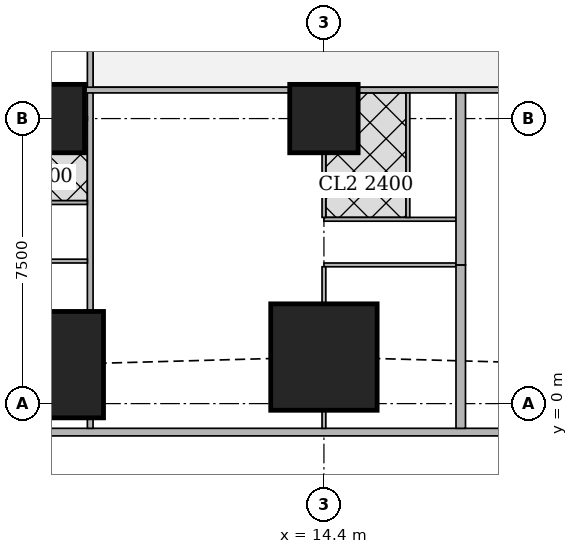
"""IFC4 building model, lengths in metres.
Left out: names, types, materials, properties, quantities, classifications, styles, units other than length and angle.
Written with IfcOpenShell. Run it as: python <this file> out.ifc"""

import sys

from ifc_helpers import new_model, si_unit, direction, frame, frame_2d, origin, origin_2d, place, context, subcontext, project, spatial, rectangle, extrude, element, fill, save


model = new_model("IFC4")
c1 = context("Model", 3, precision=1e-05, world=origin(), true_north=direction((0.0, 1.0)))
c2 = subcontext(c1, "Body", "Model", "MODEL_VIEW")
j1 = project(units=[si_unit("LENGTHUNIT", "METRE"), si_unit("PLANEANGLEUNIT", "RADIAN")], contexts=[c1])
p1 = place(None, origin())
s1 = spatial("IfcSite", under=j1, at=p1, CompositionType="ELEMENT")
p2 = place(p1, origin())
s2 = spatial("IfcBuilding", under=s1, at=p2, CompositionType="ELEMENT")
p3 = place(p2, frame((0.0, 0.0, 53.75)))
s3 = spatial("IfcBuildingStorey", under=s2, at=p3, CompositionType="ELEMENT", Elevation=53.75)
for number, where, z_axis, x_axis in (
    (1, (7.2, 1.025, 0.0), (0.0, 0.0, 1.0), (1.0, 0.0, 0.0)),
    (2, (14.4, 1.225, 0.0), (0.0, 0.0, 1.0), (1.0, 0.0, 0.0)),
):
    element("IfcColumn", number, at=place(p3, frame(where, z_axis=z_axis, x_axis=x_axis)), inside=s3, PredefinedType="COLUMN", context=c2, shape_type="SweptSolid", body=[
        extrude(rectangle(XDim=2.8, YDim=2.8, at=origin_2d()), origin(), (0.0, 0.0, 1.0), 3.75),
    ])
for number, where, z_axis, x_axis in (
    (3, (7.2, 7.5, 0.0), (0.0, 0.0, 1.0), (1.0, 0.0, 0.0)),
    (4, (14.4, 7.5, 0.0), (0.0, 0.0, 1.0), (1.0, 0.0, 0.0)),
):
    element("IfcColumn", number, at=place(p3, frame(where, z_axis=z_axis, x_axis=x_axis)), inside=s3, PredefinedType="COLUMN", context=c2, shape_type="SweptSolid", body=[
        extrude(rectangle(XDim=1.8, YDim=1.8, at=origin_2d()), origin(), (0.0, 0.0, 1.0), 3.75),
    ])
p4 = place(p3, frame((2.163, -0.75, 0.0), z_axis=(0.0, 0.0, 1.0), x_axis=(1.0, 0.0, 0.0)))
e5 = element("IfcWall", 5, at=p4, inside=s3, PredefinedType="SOLIDWALL", context=c2, shape_type="SweptSolid", body=[
    extrude(rectangle(XDim=45.628, YDim=0.2, at=frame_2d((22.814, 0.0))), origin(), (0.0, 0.0, 1.0), 3.5),
])
p5 = place(p4, frame((9.537, 0.0, 0.9)))
e6 = element("IfcOpeningElement", 6, at=p5, cuts=e5, PredefinedType="OPENING", context=c2, shape_type="SweptSolid", body=[
    extrude(rectangle(XDim=1.8, YDim=1.5, at=frame_2d((0.9, 0.75))), frame((0.0, 0.11, 0.0), z_axis=(0.0, -1.0, 0.0), x_axis=(1.0, 0.0, 0.0)), (0.0, 0.0, 1.0), 0.22),
])
p6 = place(p4, frame((13.137, 0.0, 0.9)))
e7 = element("IfcOpeningElement", 7, at=p6, cuts=e5, PredefinedType="OPENING", context=c2, shape_type="SweptSolid", body=[
    extrude(rectangle(XDim=1.8, YDim=1.5, at=frame_2d((0.9, 0.75))), frame((0.0, 0.11, 0.0), z_axis=(0.0, -1.0, 0.0), x_axis=(1.0, 0.0, 0.0)), (0.0, 0.0, 1.0), 0.22),
])
p7 = place(p4, frame((16.737, 0.0, 0.9)))
e8 = element("IfcOpeningElement", 8, at=p7, cuts=e5, PredefinedType="OPENING", context=c2, shape_type="SweptSolid", body=[
    extrude(rectangle(XDim=1.8, YDim=1.5, at=frame_2d((0.9, 0.75))), frame((0.0, 0.11, 0.0), z_axis=(0.0, -1.0, 0.0), x_axis=(1.0, 0.0, 0.0)), (0.0, 0.0, 1.0), 0.22),
])
p8 = place(p4, frame((20.337, 0.0, 0.9)))
e9 = element("IfcOpeningElement", 9, at=p8, cuts=e5, PredefinedType="OPENING", context=c2, shape_type="SweptSolid", body=[
    extrude(rectangle(XDim=1.8, YDim=1.5, at=frame_2d((0.9, 0.75))), frame((0.0, 0.11, 0.0), z_axis=(0.0, -1.0, 0.0), x_axis=(1.0, 0.0, 0.0)), (0.0, 0.0, 1.0), 0.22),
])
p9 = place(p4, frame((23.937, 0.0, 0.9)))
e10 = element("IfcOpeningElement", 10, at=p9, cuts=e5, PredefinedType="OPENING", context=c2, shape_type="SweptSolid", body=[
    extrude(rectangle(XDim=1.8, YDim=1.5, at=frame_2d((0.9, 0.75))), frame((0.0, 0.11, 0.0), z_axis=(0.0, -1.0, 0.0), x_axis=(1.0, 0.0, 0.0)), (0.0, 0.0, 1.0), 0.22),
])
p10 = place(p4, frame((27.537, 0.0, 0.9)))
e11 = element("IfcOpeningElement", 11, at=p10, cuts=e5, PredefinedType="OPENING", context=c2, shape_type="SweptSolid", body=[
    extrude(rectangle(XDim=1.8, YDim=1.5, at=frame_2d((0.9, 0.75))), frame((0.0, 0.11, 0.0), z_axis=(0.0, -1.0, 0.0), x_axis=(1.0, 0.0, 0.0)), (0.0, 0.0, 1.0), 0.22),
])
p11 = place(p4, frame((31.137, 0.0, 0.9)))
e12 = element("IfcOpeningElement", 12, at=p11, cuts=e5, PredefinedType="OPENING", context=c2, shape_type="SweptSolid", body=[
    extrude(rectangle(XDim=1.8, YDim=1.5, at=frame_2d((0.9, 0.75))), frame((0.0, 0.11, 0.0), z_axis=(0.0, -1.0, 0.0), x_axis=(1.0, 0.0, 0.0)), (0.0, 0.0, 1.0), 0.22),
])
p12 = place(p4, frame((34.737, 0.0, 0.9)))
e13 = element("IfcOpeningElement", 13, at=p12, cuts=e5, PredefinedType="OPENING", context=c2, shape_type="SweptSolid", body=[
    extrude(rectangle(XDim=1.8, YDim=1.5, at=frame_2d((0.9, 0.75))), frame((0.0, 0.11, 0.0), z_axis=(0.0, -1.0, 0.0), x_axis=(1.0, 0.0, 0.0)), (0.0, 0.0, 1.0), 0.22),
])
p13 = place(p3, frame((8.25, -0.65, 0.0), z_axis=(0.0, 0.0, 1.0), x_axis=(0.0, 1.0, 0.0)))
e14 = element("IfcWall", 14, at=p13, inside=s3, PredefinedType="SOLIDWALL", context=c2, shape_type="SweptSolid", body=[
    extrude(rectangle(XDim=0.274, YDim=0.15, at=frame_2d((0.137, 0.0))), origin(), (0.0, 0.0, 1.0), 3.5),
])
p14 = place(p3, frame((8.25, 2.426, 0.0), z_axis=(0.0, 0.0, 1.0), x_axis=(0.0, 1.0, 0.0)))
e15 = element("IfcWall", 15, at=p14, inside=s3, PredefinedType="SOLIDWALL", context=c2, shape_type="SweptSolid", body=[
    extrude(rectangle(XDim=40.173, YDim=0.15, at=frame_2d((20.086, 0.0))), origin(), (0.0, 0.0, 1.0), 3.5),
])
p15 = place(p14, frame((6.661, 0.0, 0.0)))
e16 = element("IfcOpeningElement", 16, at=p15, cuts=e15, PredefinedType="OPENING", context=c2, shape_type="SweptSolid", body=[
    extrude(rectangle(XDim=1.0, YDim=2.1, at=frame_2d((0.5, 1.05))), frame((0.0, 0.085, 0.0), z_axis=(0.0, -1.0, 0.0), x_axis=(1.0, 0.0, 0.0)), (0.0, 0.0, 1.0), 0.17),
])
p16 = place(p14, frame((9.986, 0.0, 0.0)))
e17 = element("IfcOpeningElement", 17, at=p16, cuts=e15, PredefinedType="OPENING", context=c2, shape_type="SweptSolid", body=[
    extrude(rectangle(XDim=1.0, YDim=2.1, at=frame_2d((0.5, 1.05))), frame((0.0, 0.085, 0.0), z_axis=(0.0, -1.0, 0.0), x_axis=(1.0, 0.0, 0.0)), (0.0, 0.0, 1.0), 0.17),
])
p17 = place(p14, frame((21.662, 0.0, 0.0)))
e18 = element("IfcOpeningElement", 18, at=p17, cuts=e15, PredefinedType="OPENING", context=c2, shape_type="SweptSolid", body=[
    extrude(rectangle(XDim=1.0, YDim=2.1, at=frame_2d((0.5, 1.05))), frame((0.0, 0.085, 0.0), z_axis=(0.0, -1.0, 0.0), x_axis=(1.0, 0.0, 0.0)), (0.0, 0.0, 1.0), 0.17),
])
p18 = place(p14, frame((29.161, 0.0, 0.0)))
e19 = element("IfcOpeningElement", 19, at=p18, cuts=e15, PredefinedType="OPENING", context=c2, shape_type="SweptSolid", body=[
    extrude(rectangle(XDim=1.0, YDim=2.1, at=frame_2d((0.5, 1.05))), frame((0.0, 0.085, 0.0), z_axis=(0.0, -1.0, 0.0), x_axis=(1.0, 0.0, 0.0)), (0.0, 0.0, 1.0), 0.17),
])
p19 = place(p3, frame((20.699, 8.25, 0.0), z_axis=(0.0, 0.0, 1.0), x_axis=(-1.0, 0.0, 0.0)))
e20 = element("IfcWall", 20, at=p19, inside=s3, PredefinedType="SOLIDWALL", context=c2, shape_type="SweptSolid", body=[
    extrude(rectangle(XDim=5.398, YDim=0.15, at=frame_2d((2.699, 0.0))), origin(), (0.0, 0.0, 1.0), 3.5),
])
p20 = place(p19, frame((0.799, 0.0, 0.0)))
e21 = element("IfcOpeningElement", 21, at=p20, cuts=e20, PredefinedType="OPENING", context=c2, shape_type="SweptSolid", body=[
    extrude(rectangle(XDim=1.0, YDim=2.1, at=frame_2d((0.5, 1.05))), frame((0.0, 0.085, 0.0), z_axis=(0.0, -1.0, 0.0), x_axis=(1.0, 0.0, 0.0)), (0.0, 0.0, 1.0), 0.17),
])
p21 = place(p3, frame((13.499, 8.25, 0.0), z_axis=(0.0, 0.0, 1.0), x_axis=(-1.0, 0.0, 0.0)))
e22 = element("IfcWall", 22, at=p21, inside=s3, PredefinedType="SOLIDWALL", context=c2, shape_type="SweptSolid", body=[
    extrude(rectangle(XDim=5.399, YDim=0.15, at=frame_2d((2.699, 0.0))), origin(), (0.0, 0.0, 1.0), 3.5),
])
p22 = place(p21, frame((1.674, 0.0, 0.0)))
e23 = element("IfcOpeningElement", 23, at=p22, cuts=e22, PredefinedType="OPENING", context=c2, shape_type="SweptSolid", body=[
    extrude(rectangle(XDim=1.0, YDim=2.1, at=frame_2d((0.5, 1.05))), frame((0.0, 0.085, 0.0), z_axis=(0.0, -1.0, 0.0), x_axis=(1.0, 0.0, 0.0)), (0.0, 0.0, 1.0), 0.17),
])
p23 = place(p3, frame((4.9, 3.75, 0.0), z_axis=(0.0, 0.0, 1.0), x_axis=(1.0, 0.0, 0.0)))
e24 = element("IfcWall", 24, at=p23, inside=s3, PredefinedType="PARTITIONING", context=c2, shape_type="SweptSolid", body=[
    extrude(rectangle(XDim=3.275, YDim=0.1, at=frame_2d((1.638, 0.0))), origin(), (0.0, 0.0, 1.0), 3.5),
])
p24 = place(p3, frame((8.101, 7.5, 0.0), z_axis=(0.0, 0.0, 1.0), x_axis=(1.0, 0.0, 0.0)))
e25 = element("IfcWall", 25, at=p24, inside=s3, PredefinedType="PARTITIONING", context=c2, shape_type="SweptSolid", body=[
    extrude(rectangle(XDim=0.074, YDim=0.1, at=frame_2d((0.037, 0.0))), origin(), (0.0, 0.0, 1.0), 3.5),
])
p25 = place(p3, frame((4.9, 5.29, 0.0), z_axis=(0.0, 0.0, 1.0), x_axis=(1.0, 0.0, 0.0)))
e26 = element("IfcWall", 26, at=p25, inside=s3, PredefinedType="PARTITIONING", context=c2, shape_type="SweptSolid", body=[
    extrude(rectangle(XDim=3.275, YDim=0.1, at=frame_2d((1.638, 0.0))), origin(), (0.0, 0.0, 1.0), 3.5),
])
p26 = place(p3, frame((17.875, 3.65, 0.0), z_axis=(0.0, 0.0, 1.0), x_axis=(-1.0, 0.0, 0.0)))
e27 = element("IfcWall", 27, at=p26, inside=s3, PredefinedType="PARTITIONING", context=c2, shape_type="SweptSolid", body=[
    extrude(rectangle(XDim=3.475, YDim=0.1, at=frame_2d((1.738, 0.0))), origin(), (0.0, 0.0, 1.0), 3.5),
])
p27 = place(p26, frame((1.15, 0.0, 0.0)))
e28 = element("IfcOpeningElement", 28, at=p27, cuts=e27, PredefinedType="OPENING", context=c2, shape_type="SweptSolid", body=[
    extrude(rectangle(XDim=0.9, YDim=2.1, at=frame_2d((0.45, 1.05))), frame((0.0, 0.06, 0.0), z_axis=(0.0, -1.0, 0.0), x_axis=(1.0, 0.0, 0.0)), (0.0, 0.0, 1.0), 0.12),
])
p28 = place(p3, frame((17.875, 4.85, 0.0), z_axis=(0.0, 0.0, 1.0), x_axis=(-1.0, 0.0, 0.0)))
e29 = element("IfcWall", 29, at=p28, inside=s3, PredefinedType="PARTITIONING", context=c2, shape_type="SweptSolid", body=[
    extrude(rectangle(XDim=3.475, YDim=0.1, at=frame_2d((1.738, 0.0))), origin(), (0.0, 0.0, 1.0), 3.5),
])
p29 = place(p28, frame((1.92, 0.0, 0.0)))
e30 = element("IfcOpeningElement", 30, at=p29, cuts=e29, PredefinedType="OPENING", context=c2, shape_type="SweptSolid", body=[
    extrude(rectangle(XDim=0.9, YDim=2.1, at=frame_2d((0.45, 1.05))), frame((0.0, 0.06, 0.0), z_axis=(0.0, -1.0, 0.0), x_axis=(1.0, 0.0, 0.0)), (0.0, 0.0, 1.0), 0.12),
])
p30 = place(p28, frame((0.15, 0.0, 0.0)))
e31 = element("IfcOpeningElement", 31, at=p30, cuts=e29, PredefinedType="OPENING", context=c2, shape_type="SweptSolid", body=[
    extrude(rectangle(XDim=0.9, YDim=2.1, at=frame_2d((0.45, 1.05))), frame((0.0, 0.06, 0.0), z_axis=(0.0, -1.0, 0.0), x_axis=(1.0, 0.0, 0.0)), (0.0, 0.0, 1.0), 0.12),
])
p31 = place(p3, frame((14.4, -0.65, 0.0), z_axis=(0.0, 0.0, 1.0), x_axis=(0.0, 1.0, 0.0)))
e32 = element("IfcWall", 32, at=p31, inside=s3, PredefinedType="PARTITIONING", context=c2, shape_type="SweptSolid", body=[
    extrude(rectangle(XDim=0.474, YDim=0.1, at=frame_2d((0.237, 0.0))), origin(), (0.0, 0.0, 1.0), 3.5),
])
p32 = place(p3, frame((14.4, 2.626, 0.0), z_axis=(0.0, 0.0, 1.0), x_axis=(0.0, 1.0, 0.0)))
e33 = element("IfcWall", 33, at=p32, inside=s3, PredefinedType="PARTITIONING", context=c2, shape_type="SweptSolid", body=[
    extrude(rectangle(XDim=0.974, YDim=0.1, at=frame_2d((0.487, 0.0))), origin(), (0.0, 0.0, 1.0), 3.5),
])
p33 = place(p3, frame((14.4, 4.9, 0.0), z_axis=(0.0, 0.0, 1.0), x_axis=(0.0, 1.0, 0.0)))
e34 = element("IfcWall", 34, at=p33, inside=s3, PredefinedType="PARTITIONING", context=c2, shape_type="SweptSolid", body=[
    extrude(rectangle(XDim=1.699, YDim=0.1, at=frame_2d((0.85, 0.0))), origin(), (0.0, 0.0, 1.0), 3.5),
])
p34 = place(p3, frame((16.61, 4.9, 0.0), z_axis=(0.0, 0.0, 1.0), x_axis=(0.0, 1.0, 0.0)))
e35 = element("IfcWall", 35, at=p34, inside=s3, PredefinedType="PARTITIONING", context=c2, shape_type="SweptSolid", body=[
    extrude(rectangle(XDim=3.275, YDim=0.1, at=frame_2d((1.638, 0.0))), origin(), (0.0, 0.0, 1.0), 3.5),
])
p35 = place(p3, frame((18.0, -0.65, 0.0), z_axis=(0.0, 0.0, 1.0), x_axis=(0.0, 1.0, 0.0)))
e36 = element("IfcWall", 36, at=p35, inside=s3, PredefinedType="SOLIDWALL", context=c2, shape_type="SweptSolid", body=[
    extrude(rectangle(XDim=4.3, YDim=0.25, at=frame_2d((2.15, 0.0))), origin(), (0.0, 0.0, 1.0), 2.05),
])
p36 = place(p3, frame((18.0, 3.65, 0.0), z_axis=(0.0, 0.0, 1.0), x_axis=(0.0, 1.0, 0.0)))
e37 = element("IfcWall", 37, at=p36, inside=s3, PredefinedType="SOLIDWALL", context=c2, shape_type="SweptSolid", body=[
    extrude(rectangle(XDim=4.525, YDim=0.25, at=frame_2d((2.263, 0.0))), origin(), (0.0, 0.0, 1.0), 3.5),
])
p37 = place(p5, origin())
e38 = element("IfcWindow", 38, at=p37, inside=s3, PartitioningType="SINGLE_PANEL", PredefinedType="WINDOW", context=c2, shape_type="SweptSolid", body=[
    extrude(rectangle(XDim=1.8, YDim=1.5, at=frame_2d((0.9, 0.75))), frame((0.0, 0.03, 0.0), z_axis=(0.0, -1.0, 0.0), x_axis=(1.0, 0.0, 0.0)), (0.0, 0.0, 1.0), 0.06),
])
fill(e6, e38)
p38 = place(p6, origin())
e39 = element("IfcWindow", 39, at=p38, inside=s3, PartitioningType="SINGLE_PANEL", PredefinedType="WINDOW", context=c2, shape_type="SweptSolid", body=[
    extrude(rectangle(XDim=1.8, YDim=1.5, at=frame_2d((0.9, 0.75))), frame((0.0, 0.03, 0.0), z_axis=(0.0, -1.0, 0.0), x_axis=(1.0, 0.0, 0.0)), (0.0, 0.0, 1.0), 0.06),
])
fill(e7, e39)
p39 = place(p7, origin())
e40 = element("IfcWindow", 40, at=p39, inside=s3, PartitioningType="SINGLE_PANEL", PredefinedType="WINDOW", context=c2, shape_type="SweptSolid", body=[
    extrude(rectangle(XDim=1.8, YDim=1.5, at=frame_2d((0.9, 0.75))), frame((0.0, 0.03, 0.0), z_axis=(0.0, -1.0, 0.0), x_axis=(1.0, 0.0, 0.0)), (0.0, 0.0, 1.0), 0.06),
])
fill(e8, e40)
p40 = place(p15, origin())
e41 = element("IfcDoor", 41, at=p40, inside=s3, OperationType="SINGLE_SWING_RIGHT", PredefinedType="DOOR", context=c2, shape_type="SweptSolid", body=[
    extrude(rectangle(XDim=1.0, YDim=2.1, at=frame_2d((0.5, 1.05))), frame((0.0, 0.025, 0.0), z_axis=(0.0, -1.0, 0.0), x_axis=(1.0, 0.0, 0.0)), (0.0, 0.0, 1.0), 0.05),
])
fill(e16, e41)
p41 = place(p27, origin())
e42 = element("IfcDoor", 42, at=p41, inside=s3, OperationType="SINGLE_SWING_LEFT", PredefinedType="DOOR", context=c2, shape_type="SweptSolid", body=[
    extrude(rectangle(XDim=0.9, YDim=2.1, at=frame_2d((0.45, 1.05))), frame((0.0, 0.025, 0.0), z_axis=(0.0, -1.0, 0.0), x_axis=(1.0, 0.0, 0.0)), (0.0, 0.0, 1.0), 0.05),
])
fill(e28, e42)
p42 = place(p29, origin())
e43 = element("IfcDoor", 43, at=p42, inside=s3, OperationType="SINGLE_SWING_LEFT", PredefinedType="DOOR", context=c2, shape_type="SweptSolid", body=[
    extrude(rectangle(XDim=0.9, YDim=2.1, at=frame_2d((0.45, 1.05))), frame((0.0, 0.025, 0.0), z_axis=(0.0, -1.0, 0.0), x_axis=(1.0, 0.0, 0.0)), (0.0, 0.0, 1.0), 0.05),
])
fill(e30, e43)
p43 = place(p30, origin())
e44 = element("IfcDoor", 44, at=p43, inside=s3, OperationType="SINGLE_SWING_RIGHT", PredefinedType="DOOR", context=c2, shape_type="SweptSolid", body=[
    extrude(rectangle(XDim=0.9, YDim=2.1, at=frame_2d((0.45, 1.05))), frame((0.0, 0.025, 0.0), z_axis=(0.0, -1.0, 0.0), x_axis=(1.0, 0.0, 0.0)), (0.0, 0.0, 1.0), 0.05),
])
fill(e31, e44)
p44 = place(p22, origin())
e45 = element("IfcDoor", 45, at=p44, inside=s3, OperationType="SINGLE_SWING_RIGHT", PredefinedType="DOOR", context=c2, shape_type="SweptSolid", body=[
    extrude(rectangle(XDim=1.0, YDim=2.1, at=frame_2d((0.5, 1.05))), frame((0.0, 0.025, 0.0), z_axis=(0.0, -1.0, 0.0), x_axis=(1.0, 0.0, 0.0)), (0.0, 0.0, 1.0), 0.05),
])
fill(e23, e45)
p45 = place(p20, origin())
e46 = element("IfcDoor", 46, at=p45, inside=s3, OperationType="SINGLE_SWING_LEFT", PredefinedType="DOOR", context=c2, shape_type="SweptSolid", body=[
    extrude(rectangle(XDim=1.0, YDim=2.1, at=frame_2d((0.5, 1.05))), frame((0.0, 0.025, 0.0), z_axis=(0.0, -1.0, 0.0), x_axis=(1.0, 0.0, 0.0)), (0.0, 0.0, 1.0), 0.05),
])
fill(e21, e46)
save(model, sys.argv[1])
